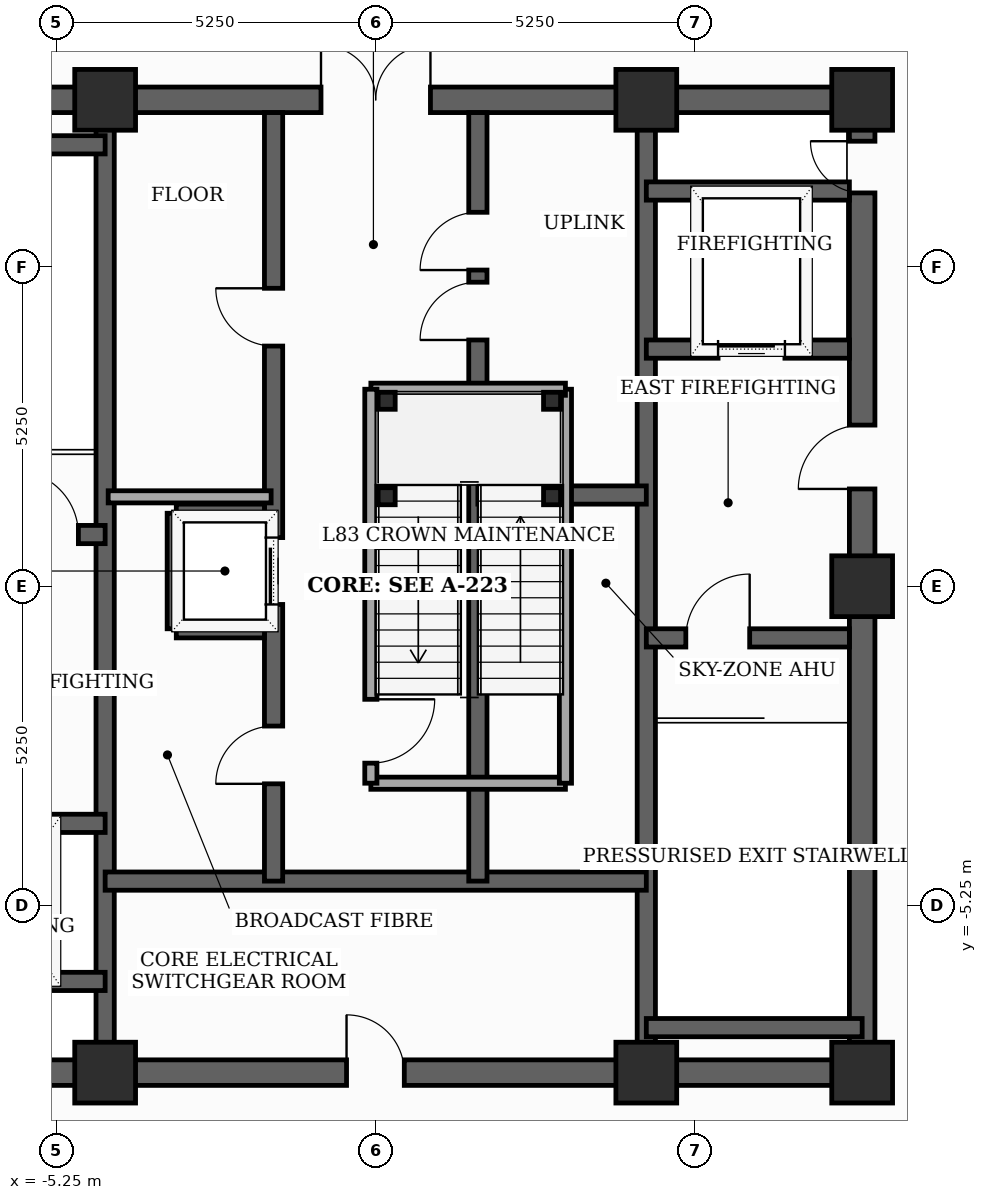
"""IFC4 building model, lengths in metres.
Left out: names, types, materials, properties, quantities, classifications, styles, units other than length and angle.
Written with IfcOpenShell. Run it as: python <this file> out.ifc"""

import sys

from ifc_helpers import new_model, si_unit, direction, frame, frame_2d, origin, origin_2d, place, context, subcontext, project, spatial, rectangle, i_section, extrude, element, fill, save


model = new_model("IFC4")
c1 = context("Model", 3, precision=1e-05, world=origin(), true_north=direction((0.0, 1.0)))
c2 = subcontext(c1, "Body", "Model", "MODEL_VIEW")
j1 = project(units=[si_unit("LENGTHUNIT", "METRE"), si_unit("PLANEANGLEUNIT", "RADIAN")], contexts=[c1])
p1 = place(None, origin())
s1 = spatial("IfcSite", under=j1, at=p1, CompositionType="ELEMENT")
p2 = place(p1, origin())
s2 = spatial("IfcBuilding", under=s1, at=p2, CompositionType="ELEMENT")
p3 = place(p2, frame((0.0, 0.0, 322.0)))
s3 = spatial("IfcBuildingStorey", under=s2, at=p3, CompositionType="ELEMENT", Elevation=322.0)
for number, where, z_axis, x_axis in (
    (1, (-4.45, -8.0, 0.0), (0.0, 0.0, 1.0), (1.0, 0.0, 0.0)),
    (2, (4.45, -8.0, 0.0), (0.0, 0.0, 1.0), (1.0, 0.0, 0.0)),
    (3, (8.0, -8.0, 0.0), (0.0, 0.0, 1.0), (1.0, 0.0, 0.0)),
    (4, (8.0, 0.0, 0.0), (0.0, 0.0, 1.0), (1.0, 0.0, 0.0)),
    (5, (8.0, 8.0, 0.0), (0.0, 0.0, 1.0), (1.0, 0.0, 0.0)),
    (6, (4.45, 8.0, 0.0), (0.0, 0.0, 1.0), (1.0, 0.0, 0.0)),
    (7, (-4.45, 8.0, 0.0), (0.0, 0.0, 1.0), (1.0, 0.0, 0.0)),
):
    element("IfcColumn", number, at=place(p3, frame(where, z_axis=z_axis, x_axis=x_axis)), inside=s3, PredefinedType="COLUMN", context=c2, shape_type="SweptSolid", body=[
        extrude(rectangle(XDim=1.0, YDim=1.0, at=origin_2d()), origin(), (0.0, 0.0, 1.0), 4.6),
    ])
for number, where, z_axis, x_axis in (
    (8, (0.18, 1.48, 0.0), (0.0, 0.0, 1.0), (1.0, 0.0, 0.0)),
    (9, (2.9, 1.48, 0.0), (0.0, 0.0, 1.0), (1.0, 0.0, 0.0)),
    (10, (0.18, 3.05, 0.0), (0.0, 0.0, 1.0), (1.0, 0.0, 0.0)),
    (11, (2.9, 3.05, 0.0), (0.0, 0.0, 1.0), (1.0, 0.0, 0.0)),
):
    element("IfcColumn", number, at=place(p3, frame(where, z_axis=z_axis, x_axis=x_axis)), inside=s3, PredefinedType="PILASTER", context=c2, shape_type="SweptSolid", body=[
        extrude(i_section(OverallWidth=0.28, OverallDepth=0.28, WebThickness=0.01, FlangeThickness=0.018, at=origin_2d()), origin(), (0.0, 0.0, 1.0), 4.6),
    ])
p4 = place(p3, frame((8.0, -8.0, 0.0), z_axis=(0.0, 0.0, 1.0), x_axis=(0.0, 1.0, 0.0)))
e12 = element("IfcWall", 12, at=p4, inside=s3, PredefinedType="SHEAR", context=c2, shape_type="SweptSolid", body=[
    extrude(rectangle(XDim=16.0, YDim=0.42, at=frame_2d((8.0, 0.0))), origin(), (0.0, 0.0, 1.0), 4.38),
])
p5 = place(p4, frame((9.6, 0.0, 0.0)))
e13 = element("IfcOpeningElement", 13, at=p5, cuts=e12, PredefinedType="OPENING", context=c2, shape_type="SweptSolid", body=[
    extrude(rectangle(XDim=1.05, YDim=2.15, at=frame_2d((0.525, 1.075))), frame((0.0, 0.22, 0.0), z_axis=(0.0, -1.0, 0.0), x_axis=(1.0, 0.0, 0.0)), (0.0, 0.0, 1.0), 0.44),
])
p6 = place(p4, frame((14.469, 0.0, 0.0)))
e14 = element("IfcOpeningElement", 14, at=p6, cuts=e12, PredefinedType="OPENING", context=c2, shape_type="SweptSolid", body=[
    extrude(rectangle(XDim=0.85, YDim=2.02, at=frame_2d((0.425, 1.01))), frame((0.0, 0.22, 0.0), z_axis=(0.0, -1.0, 0.0), x_axis=(1.0, 0.0, 0.0)), (0.0, 0.0, 1.0), 0.44),
])
p7 = place(p3, frame((-8.0, -8.0, 0.0), z_axis=(0.0, 0.0, 1.0), x_axis=(1.0, 0.0, 0.0)))
e15 = element("IfcWall", 15, at=p7, inside=s3, PredefinedType="SHEAR", context=c2, shape_type="SweptSolid", body=[
    extrude(rectangle(XDim=16.0, YDim=0.42, at=frame_2d((8.0, 0.0))), origin(), (0.0, 0.0, 1.0), 4.38),
])
p8 = place(p7, frame((7.52, 0.0, 0.0)))
e16 = element("IfcOpeningElement", 16, at=p8, cuts=e15, PredefinedType="OPENING", context=c2, shape_type="SweptSolid", body=[
    extrude(rectangle(XDim=0.95, YDim=2.1, at=frame_2d((0.475, 1.05))), frame((0.0, 0.22, 0.0), z_axis=(0.0, -1.0, 0.0), x_axis=(1.0, 0.0, 0.0)), (0.0, 0.0, 1.0), 0.44),
])
p9 = place(p3, frame((-8.0, 8.0, 0.0), z_axis=(0.0, 0.0, 1.0), x_axis=(1.0, 0.0, 0.0)))
e17 = element("IfcWall", 17, at=p9, inside=s3, PredefinedType="SHEAR", context=c2, shape_type="SweptSolid", body=[
    extrude(rectangle(XDim=16.0, YDim=0.42, at=frame_2d((8.0, 0.0))), origin(), (0.0, 0.0, 1.0), 4.38),
])
p10 = place(p9, frame((7.1, 0.0, 0.0)))
e18 = element("IfcOpeningElement", 18, at=p10, cuts=e17, PredefinedType="OPENING", context=c2, shape_type="SweptSolid", body=[
    extrude(rectangle(XDim=1.8, YDim=2.15, at=frame_2d((0.9, 1.075))), frame((0.0, 0.22, 0.0), z_axis=(0.0, -1.0, 0.0), x_axis=(1.0, 0.0, 0.0)), (0.0, 0.0, 1.0), 0.44),
])
for number, where, z_axis, x_axis in (
    (19, (-4.45, -7.79, 0.0), (0.0, 0.0, 1.0), (0.0, 1.0, 0.0)),
    (20, (4.45, -7.79, 0.0), (0.0, 0.0, 1.0), (0.0, 1.0, 0.0)),
):
    element("IfcWall", number, at=place(p3, frame(where, z_axis=z_axis, x_axis=x_axis)), inside=s3, PredefinedType="SHEAR", context=c2, shape_type="SweptSolid", body=[
        extrude(rectangle(XDim=15.58, YDim=0.3, at=frame_2d((7.79, 0.0))), origin(), (0.0, 0.0, 1.0), 4.38),
    ])
p11 = place(p3, frame((-7.79, 0.85, 0.0), z_axis=(0.0, 0.0, 1.0), x_axis=(1.0, 0.0, 0.0)))
e21 = element("IfcWall", 21, at=p11, inside=s3, PredefinedType="SHEAR", context=c2, shape_type="SweptSolid", body=[
    extrude(rectangle(XDim=3.34, YDim=0.3, at=frame_2d((1.67, 0.0))), origin(), (0.0, 0.0, 1.0), 4.38),
])
p12 = place(p11, frame((1.85, 0.0, 0.0)))
e22 = element("IfcOpeningElement", 22, at=p12, cuts=e21, PredefinedType="OPENING", context=c2, shape_type="SweptSolid", body=[
    extrude(rectangle(XDim=1.05, YDim=2.15, at=frame_2d((0.525, 1.075))), frame((0.0, 0.16, 0.0), z_axis=(0.0, -1.0, 0.0), x_axis=(1.0, 0.0, 0.0)), (0.0, 0.0, 1.0), 0.32),
])
p13 = place(p3, frame((-7.79, 7.26, 0.0), z_axis=(0.0, 0.0, 1.0), x_axis=(1.0, 0.0, 0.0)))
e23 = element("IfcWall", 23, at=p13, inside=s3, PredefinedType="SHEAR", context=c2, shape_type="SweptSolid", body=[
    extrude(rectangle(XDim=3.34, YDim=0.3, at=frame_2d((1.67, 0.0))), origin(), (0.0, 0.0, 1.0), 4.38),
])
p14 = place(p3, frame((4.45, -0.85, 0.0), z_axis=(0.0, 0.0, 1.0), x_axis=(1.0, 0.0, 0.0)))
e24 = element("IfcWall", 24, at=p14, inside=s3, PredefinedType="SHEAR", context=c2, shape_type="SweptSolid", body=[
    extrude(rectangle(XDim=3.34, YDim=0.3, at=frame_2d((1.67, 0.0))), origin(), (0.0, 0.0, 1.0), 4.38),
])
p15 = place(p14, frame((0.65, 0.0, 0.0)))
e25 = element("IfcOpeningElement", 25, at=p15, cuts=e24, PredefinedType="OPENING", context=c2, shape_type="SweptSolid", body=[
    extrude(rectangle(XDim=1.05, YDim=2.15, at=frame_2d((0.525, 1.075))), frame((0.0, 0.16, 0.0), z_axis=(0.0, -1.0, 0.0), x_axis=(1.0, 0.0, 0.0)), (0.0, 0.0, 1.0), 0.32),
])
p16 = place(p3, frame((4.45, -7.26, 0.0), z_axis=(0.0, 0.0, 1.0), x_axis=(1.0, 0.0, 0.0)))
e26 = element("IfcWall", 26, at=p16, inside=s3, PredefinedType="SHEAR", context=c2, shape_type="SweptSolid", body=[
    extrude(rectangle(XDim=3.55, YDim=0.3, at=frame_2d((1.775, 0.0))), origin(), (0.0, 0.0, 1.0), 4.38),
])
p17 = place(p3, frame((-7.79, -3.9, 0.0), z_axis=(0.0, 0.0, 1.0), x_axis=(1.0, 0.0, 0.0)))
e27 = element("IfcWall", 27, at=p17, inside=s3, PredefinedType="SHEAR", context=c2, shape_type="SweptSolid", body=[
    extrude(rectangle(XDim=3.34, YDim=0.3, at=frame_2d((1.67, 0.0))), origin(), (0.0, 0.0, 1.0), 4.38),
])
p18 = place(p17, frame((1.27, 0.0, 0.0)))
e28 = element("IfcOpeningElement", 28, at=p18, cuts=e27, PredefinedType="OPENING", context=c2, shape_type="SweptSolid", body=[
    extrude(rectangle(XDim=1.1, YDim=2.1, at=frame_2d((0.55, 1.05))), frame((0.0, 0.16, 0.0), z_axis=(0.0, -1.0, 0.0), x_axis=(1.0, 0.0, 0.0)), (0.0, 0.0, 1.0), 0.32),
])
p19 = place(p3, frame((-7.79, -6.5, 0.0), z_axis=(0.0, 0.0, 1.0), x_axis=(1.0, 0.0, 0.0)))
e29 = element("IfcWall", 29, at=p19, inside=s3, PredefinedType="SHEAR", context=c2, shape_type="SweptSolid", body=[
    extrude(rectangle(XDim=3.34, YDim=0.3, at=frame_2d((1.67, 0.0))), origin(), (0.0, 0.0, 1.0), 4.38),
])
p20 = place(p3, frame((4.45, 3.9, 0.0), z_axis=(0.0, 0.0, 1.0), x_axis=(1.0, 0.0, 0.0)))
e30 = element("IfcWall", 30, at=p20, inside=s3, PredefinedType="SHEAR", context=c2, shape_type="SweptSolid", body=[
    extrude(rectangle(XDim=3.34, YDim=0.3, at=frame_2d((1.67, 0.0))), origin(), (0.0, 0.0, 1.0), 4.38),
])
p21 = place(p20, frame((1.18, 0.0, 0.0)))
e31 = element("IfcOpeningElement", 31, at=p21, cuts=e30, PredefinedType="OPENING", context=c2, shape_type="SweptSolid", body=[
    extrude(rectangle(XDim=1.1, YDim=2.1, at=frame_2d((0.55, 1.05))), frame((0.0, 0.16, 0.0), z_axis=(0.0, -1.0, 0.0), x_axis=(1.0, 0.0, 0.0)), (0.0, 0.0, 1.0), 0.32),
])
p22 = place(p3, frame((4.45, 6.5, 0.0), z_axis=(0.0, 0.0, 1.0), x_axis=(1.0, 0.0, 0.0)))
e32 = element("IfcWall", 32, at=p22, inside=s3, PredefinedType="SHEAR", context=c2, shape_type="SweptSolid", body=[
    extrude(rectangle(XDim=3.34, YDim=0.3, at=frame_2d((1.67, 0.0))), origin(), (0.0, 0.0, 1.0), 4.38),
])
p23 = place(p3, frame((-4.45, -4.85, 0.0), z_axis=(0.0, 0.0, 1.0), x_axis=(1.0, 0.0, 0.0)))
e33 = element("IfcWall", 33, at=p23, inside=s3, PredefinedType="SHEAR", context=c2, shape_type="SweptSolid", body=[
    extrude(rectangle(XDim=8.9, YDim=0.3, at=frame_2d((4.45, 0.0))), origin(), (0.0, 0.0, 1.0), 4.38),
])
p24 = place(p3, frame((-1.68, -4.85, 0.0), z_axis=(0.0, 0.0, 1.0), x_axis=(0.0, 1.0, 0.0)))
e34 = element("IfcWall", 34, at=p24, inside=s3, PredefinedType="SHEAR", context=c2, shape_type="SweptSolid", body=[
    extrude(rectangle(XDim=12.64, YDim=0.3, at=frame_2d((6.32, 0.0))), origin(), (0.0, 0.0, 1.0), 4.38),
])
p25 = place(p24, frame((1.6, 0.0, 0.0)))
e35 = element("IfcOpeningElement", 35, at=p25, cuts=e34, PredefinedType="OPENING", context=c2, shape_type="SweptSolid", body=[
    extrude(rectangle(XDim=0.95, YDim=2.1, at=frame_2d((0.475, 1.05))), frame((0.0, 0.16, 0.0), z_axis=(0.0, -1.0, 0.0), x_axis=(1.0, 0.0, 0.0)), (0.0, 0.0, 1.0), 0.32),
])
p26 = place(p24, frame((4.55, 0.0, 0.0)))
e36 = element("IfcOpeningElement", 36, at=p26, cuts=e34, PredefinedType="OPENING", context=c2, shape_type="SweptSolid", body=[
    extrude(rectangle(XDim=1.1, YDim=2.1, at=frame_2d((0.55, 1.05))), frame((0.0, 0.16, 0.0), z_axis=(0.0, -1.0, 0.0), x_axis=(1.0, 0.0, 0.0)), (0.0, 0.0, 1.0), 0.32),
])
p27 = place(p24, frame((8.8, 0.0, 0.0)))
e37 = element("IfcOpeningElement", 37, at=p27, cuts=e34, PredefinedType="OPENING", context=c2, shape_type="SweptSolid", body=[
    extrude(rectangle(XDim=0.95, YDim=2.1, at=frame_2d((0.475, 1.05))), frame((0.0, 0.16, 0.0), z_axis=(0.0, -1.0, 0.0), x_axis=(1.0, 0.0, 0.0)), (0.0, 0.0, 1.0), 0.32),
])
p28 = place(p3, frame((1.68, -4.85, 0.0), z_axis=(0.0, 0.0, 1.0), x_axis=(0.0, 1.0, 0.0)))
e38 = element("IfcWall", 38, at=p28, inside=s3, PredefinedType="SHEAR", context=c2, shape_type="SweptSolid", body=[
    extrude(rectangle(XDim=12.64, YDim=0.3, at=frame_2d((6.32, 0.0))), origin(), (0.0, 0.0, 1.0), 4.38),
])
p29 = place(p28, frame((10.05, 0.0, 0.0)))
e39 = element("IfcOpeningElement", 39, at=p29, cuts=e38, PredefinedType="OPENING", context=c2, shape_type="SweptSolid", body=[
    extrude(rectangle(XDim=0.95, YDim=2.1, at=frame_2d((0.475, 1.05))), frame((0.0, 0.16, 0.0), z_axis=(0.0, -1.0, 0.0), x_axis=(1.0, 0.0, 0.0)), (0.0, 0.0, 1.0), 0.32),
])
p30 = place(p28, frame((8.9, 0.0, 0.0)))
e40 = element("IfcOpeningElement", 40, at=p30, cuts=e38, PredefinedType="OPENING", context=c2, shape_type="SweptSolid", body=[
    extrude(rectangle(XDim=0.95, YDim=2.1, at=frame_2d((0.475, 1.05))), frame((0.0, 0.16, 0.0), z_axis=(0.0, -1.0, 0.0), x_axis=(1.0, 0.0, 0.0)), (0.0, 0.0, 1.0), 0.32),
])
p31 = place(p3, frame((1.68, 1.5, 0.0), z_axis=(0.0, 0.0, 1.0), x_axis=(1.0, 0.0, 0.0)))
e41 = element("IfcWall", 41, at=p31, inside=s3, PredefinedType="SHEAR", context=c2, shape_type="SweptSolid", body=[
    extrude(rectangle(XDim=2.77, YDim=0.3, at=frame_2d((1.385, 0.0))), origin(), (0.0, 0.0, 1.0), 4.38),
])
p32 = place(p3, frame((-3.28, -0.7, 0.0), z_axis=(0.0, 0.0, 1.0), x_axis=(1.0, 0.0, 0.0)))
e42 = element("IfcWall", 42, at=p32, inside=s3, PredefinedType="SHEAR", context=c2, shape_type="SweptSolid", body=[
    extrude(rectangle(XDim=1.45, YDim=0.3, at=frame_2d((0.725, 0.0))), origin(), (0.0, 0.0, 1.0), 4.38),
])
p33 = place(p3, frame((-3.28, -0.7, 0.0), z_axis=(0.0, 0.0, 1.0), x_axis=(0.0, 1.0, 0.0)))
e43 = element("IfcWall", 43, at=p33, inside=s3, PredefinedType="SHEAR", context=c2, shape_type="SweptSolid", body=[
    extrude(rectangle(XDim=1.9, YDim=0.3, at=frame_2d((0.95, 0.0))), origin(), (0.0, 0.0, 1.0), 4.38),
])
p34 = place(p3, frame((-3.28, 1.2, 0.0), z_axis=(0.0, 0.0, 1.0), x_axis=(1.0, 0.0, 0.0)))
e44 = element("IfcWall", 44, at=p34, inside=s3, PredefinedType="SHEAR", context=c2, shape_type="SweptSolid", body=[
    extrude(rectangle(XDim=1.45, YDim=0.3, at=frame_2d((0.725, 0.0))), origin(), (0.0, 0.0, 1.0), 4.38),
])
p35 = place(p3, frame((-4.4, 1.47, 0.0), z_axis=(0.0, 0.0, 1.0), x_axis=(1.0, 0.0, 0.0)))
e45 = element("IfcWall", 45, at=p35, inside=s3, PredefinedType="SOLIDWALL", context=c2, shape_type="SweptSolid", body=[
    extrude(rectangle(XDim=2.68, YDim=0.2, at=frame_2d((1.34, 0.0))), origin(), (0.0, 0.0, 1.0), 4.38),
])
p36 = place(p3, frame((-0.08, -3.24, 0.0), z_axis=(0.0, 0.0, 1.0), x_axis=(1.0, 0.0, 0.0)))
e46 = element("IfcWall", 46, at=p36, inside=s3, PredefinedType="SOLIDWALL", context=c2, shape_type="SweptSolid", body=[
    extrude(rectangle(XDim=3.2, YDim=0.2, at=frame_2d((1.6, 0.0))), origin(), (0.0, 0.0, 1.0), 4.38),
])
p37 = place(p3, frame((3.12, -3.24, 0.0), z_axis=(0.0, 0.0, 1.0), x_axis=(0.0, 1.0, 0.0)))
e47 = element("IfcWall", 47, at=p37, inside=s3, PredefinedType="SOLIDWALL", context=c2, shape_type="SweptSolid", body=[
    extrude(rectangle(XDim=6.48, YDim=0.2, at=frame_2d((3.24, 0.0))), origin(), (0.0, 0.0, 1.0), 4.38),
])
p38 = place(p3, frame((3.12, 3.24, 0.0), z_axis=(0.0, 0.0, 1.0), x_axis=(-1.0, 0.0, 0.0)))
e48 = element("IfcWall", 48, at=p38, inside=s3, PredefinedType="SOLIDWALL", context=c2, shape_type="SweptSolid", body=[
    extrude(rectangle(XDim=3.2, YDim=0.2, at=frame_2d((1.6, 0.0))), origin(), (0.0, 0.0, 1.0), 4.38),
])
p39 = place(p3, frame((-0.08, 3.24, 0.0), z_axis=(0.0, 0.0, 1.0), x_axis=(0.0, -1.0, 0.0)))
e49 = element("IfcWall", 49, at=p39, inside=s3, PredefinedType="SOLIDWALL", context=c2, shape_type="SweptSolid", body=[
    extrude(rectangle(XDim=6.48, YDim=0.2, at=frame_2d((3.24, 0.0))), origin(), (0.0, 0.0, 1.0), 4.38),
])
p40 = place(p39, frame((5.1, 0.0, 0.0)))
e50 = element("IfcOpeningElement", 50, at=p40, cuts=e49, PredefinedType="OPENING", context=c2, shape_type="SweptSolid", body=[
    extrude(rectangle(XDim=1.05, YDim=2.15, at=frame_2d((0.525, 1.075))), frame((0.0, 0.11, 0.0), z_axis=(0.0, -1.0, 0.0), x_axis=(1.0, 0.0, 0.0)), (0.0, 0.0, 1.0), 0.22),
])
p41 = place(p5, origin())
e51 = element("IfcDoor", 51, at=p41, inside=s3, OperationType="SINGLE_SWING_LEFT", PredefinedType="DOOR", context=c2, shape_type="SweptSolid", body=[
    extrude(rectangle(XDim=1.05, YDim=2.15, at=frame_2d((0.525, 1.075))), frame((0.0, 0.025, 0.0), z_axis=(0.0, -1.0, 0.0), x_axis=(1.0, 0.0, 0.0)), (0.0, 0.0, 1.0), 0.05),
])
fill(e13, e51)
p42 = place(p6, origin())
e52 = element("IfcDoor", 52, at=p42, inside=s3, OperationType="SINGLE_SWING_RIGHT", PredefinedType="TRAPDOOR", context=c2, shape_type="SweptSolid", body=[
    extrude(rectangle(XDim=0.85, YDim=2.02, at=frame_2d((0.425, 1.01))), frame((0.0, 0.025, 0.0), z_axis=(0.0, -1.0, 0.0), x_axis=(1.0, 0.0, 0.0)), (0.0, 0.0, 1.0), 0.05),
])
fill(e14, e52)
p43 = place(p8, origin())
e53 = element("IfcDoor", 53, at=p43, inside=s3, OperationType="SINGLE_SWING_LEFT", PredefinedType="DOOR", context=c2, shape_type="SweptSolid", body=[
    extrude(rectangle(XDim=0.95, YDim=2.1, at=frame_2d((0.475, 1.05))), frame((0.0, 0.025, 0.0), z_axis=(0.0, -1.0, 0.0), x_axis=(1.0, 0.0, 0.0)), (0.0, 0.0, 1.0), 0.05),
])
fill(e16, e53)
p44 = place(p10, origin())
e54 = element("IfcDoor", 54, at=p44, inside=s3, OperationType="DOUBLE_DOOR_SINGLE_SWING", PredefinedType="DOOR", context=c2, shape_type="SweptSolid", body=[
    extrude(rectangle(XDim=1.8, YDim=2.15, at=frame_2d((0.9, 1.075))), frame((0.0, 0.025, 0.0), z_axis=(0.0, -1.0, 0.0), x_axis=(1.0, 0.0, 0.0)), (0.0, 0.0, 1.0), 0.05),
])
fill(e18, e54)
p45 = place(p12, origin())
e55 = element("IfcDoor", 55, at=p45, inside=s3, OperationType="SINGLE_SWING_LEFT", PredefinedType="DOOR", context=c2, shape_type="SweptSolid", body=[
    extrude(rectangle(XDim=1.05, YDim=2.15, at=frame_2d((0.525, 1.075))), frame((0.0, 0.025, 0.0), z_axis=(0.0, -1.0, 0.0), x_axis=(1.0, 0.0, 0.0)), (0.0, 0.0, 1.0), 0.05),
])
fill(e22, e55)
p46 = place(p15, origin())
e56 = element("IfcDoor", 56, at=p46, inside=s3, OperationType="SINGLE_SWING_RIGHT", PredefinedType="DOOR", context=c2, shape_type="SweptSolid", body=[
    extrude(rectangle(XDim=1.05, YDim=2.15, at=frame_2d((0.525, 1.075))), frame((0.0, 0.025, 0.0), z_axis=(0.0, -1.0, 0.0), x_axis=(1.0, 0.0, 0.0)), (0.0, 0.0, 1.0), 0.05),
])
fill(e25, e56)
p47 = place(p21, origin())
e57 = element("IfcDoor", 57, at=p47, inside=s3, OperationType="SLIDING_TO_LEFT", PredefinedType="DOOR", context=c2, shape_type="SweptSolid", body=[
    extrude(rectangle(XDim=1.1, YDim=2.1, at=frame_2d((0.55, 1.05))), frame((0.0, 0.025, 0.0), z_axis=(0.0, -1.0, 0.0), x_axis=(1.0, 0.0, 0.0)), (0.0, 0.0, 1.0), 0.05),
])
fill(e31, e57)
p48 = place(p25, origin())
e58 = element("IfcDoor", 58, at=p48, inside=s3, OperationType="SINGLE_SWING_LEFT", PredefinedType="DOOR", context=c2, shape_type="SweptSolid", body=[
    extrude(rectangle(XDim=0.95, YDim=2.1, at=frame_2d((0.475, 1.05))), frame((0.0, 0.025, 0.0), z_axis=(0.0, -1.0, 0.0), x_axis=(1.0, 0.0, 0.0)), (0.0, 0.0, 1.0), 0.05),
])
fill(e35, e58)
p49 = place(p26, origin())
e59 = element("IfcDoor", 59, at=p49, inside=s3, OperationType="SLIDING_TO_LEFT", PredefinedType="DOOR", context=c2, shape_type="SweptSolid", body=[
    extrude(rectangle(XDim=1.1, YDim=2.1, at=frame_2d((0.55, 1.05))), frame((0.0, 0.025, 0.0), z_axis=(0.0, -1.0, 0.0), x_axis=(1.0, 0.0, 0.0)), (0.0, 0.0, 1.0), 0.05),
])
fill(e36, e59)
p50 = place(p27, origin())
e60 = element("IfcDoor", 60, at=p50, inside=s3, OperationType="SINGLE_SWING_RIGHT", PredefinedType="DOOR", context=c2, shape_type="SweptSolid", body=[
    extrude(rectangle(XDim=0.95, YDim=2.1, at=frame_2d((0.475, 1.05))), frame((0.0, 0.025, 0.0), z_axis=(0.0, -1.0, 0.0), x_axis=(1.0, 0.0, 0.0)), (0.0, 0.0, 1.0), 0.05),
])
fill(e37, e60)
p51 = place(p29, origin())
e61 = element("IfcDoor", 61, at=p51, inside=s3, OperationType="SINGLE_SWING_LEFT", PredefinedType="DOOR", context=c2, shape_type="SweptSolid", body=[
    extrude(rectangle(XDim=0.95, YDim=2.1, at=frame_2d((0.475, 1.05))), frame((0.0, 0.025, 0.0), z_axis=(0.0, -1.0, 0.0), x_axis=(1.0, 0.0, 0.0)), (0.0, 0.0, 1.0), 0.05),
])
fill(e39, e61)
p52 = place(p30, origin())
e62 = element("IfcDoor", 62, at=p52, inside=s3, OperationType="SINGLE_SWING_LEFT", PredefinedType="DOOR", context=c2, shape_type="SweptSolid", body=[
    extrude(rectangle(XDim=0.95, YDim=2.1, at=frame_2d((0.475, 1.05))), frame((0.0, 0.025, 0.0), z_axis=(0.0, -1.0, 0.0), x_axis=(1.0, 0.0, 0.0)), (0.0, 0.0, 1.0), 0.05),
])
fill(e40, e62)
p53 = place(p40, origin())
e63 = element("IfcDoor", 63, at=p53, inside=s3, OperationType="SINGLE_SWING_LEFT", PredefinedType="DOOR", context=c2, shape_type="SweptSolid", body=[
    extrude(rectangle(XDim=1.05, YDim=2.15, at=frame_2d((0.525, 1.075))), frame((0.0, 0.025, 0.0), z_axis=(0.0, -1.0, 0.0), x_axis=(1.0, 0.0, 0.0)), (0.0, 0.0, 1.0), 0.05),
])
fill(e50, e63)
save(model, sys.argv[1])
